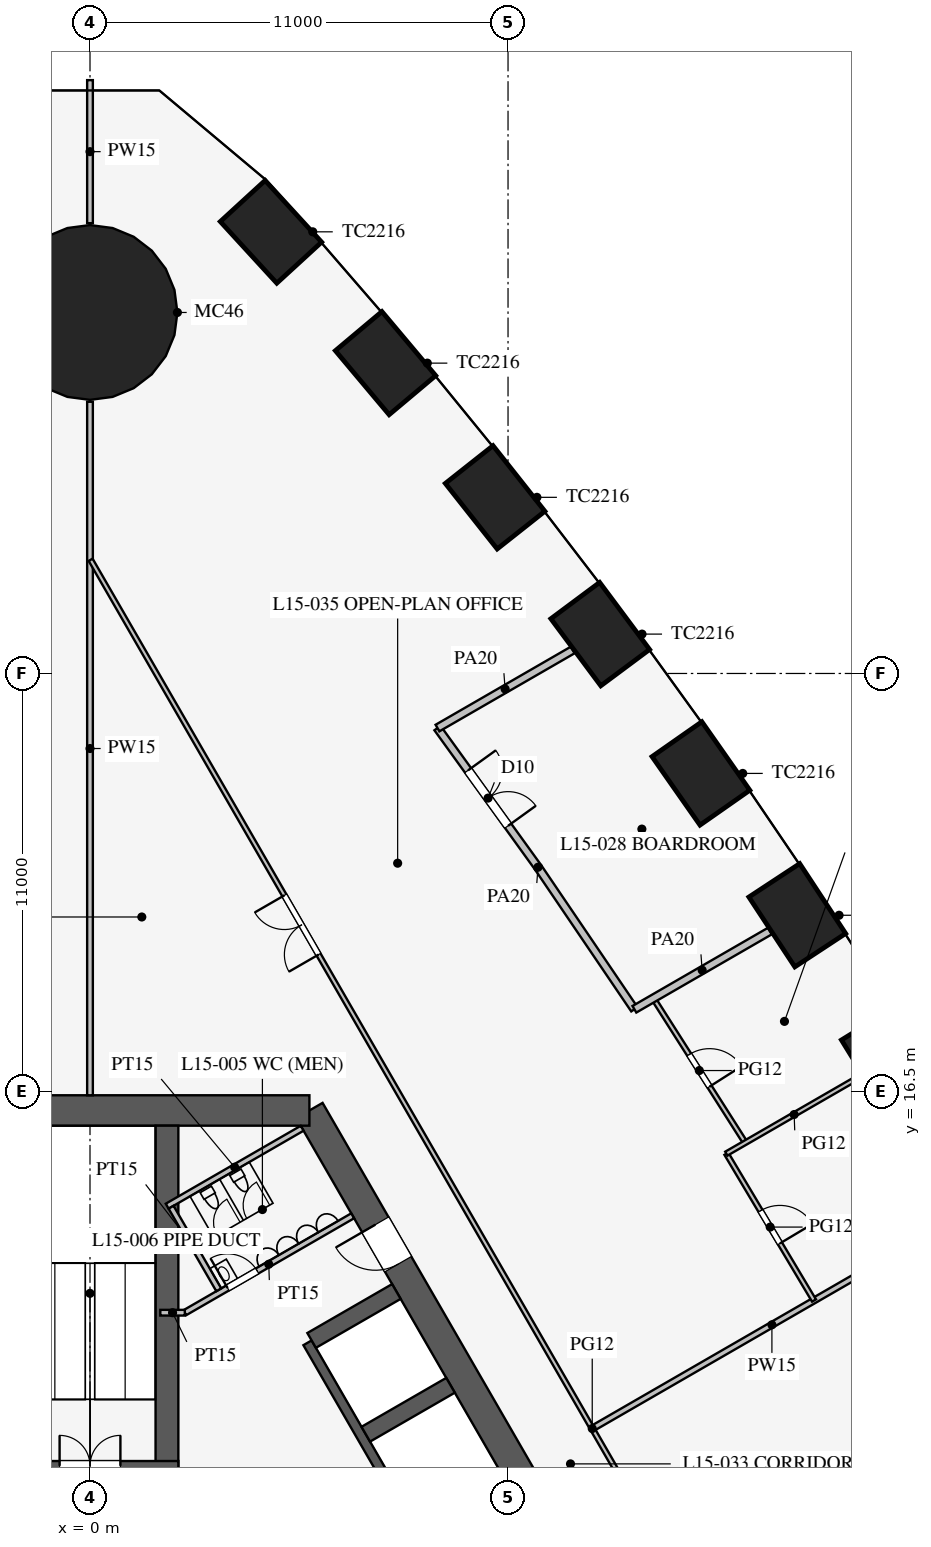
"""IFC4 building model, lengths in metres.
Left out: names, types, materials, properties, quantities, classifications, styles, units other than length and angle.
Written with IfcOpenShell. Run it as: python <this file> out.ifc"""

import sys

from ifc_helpers import new_model, si_unit, direction, frame, frame_2d, origin, origin_2d, place, context, subcontext, project, spatial, rectangle, circle, extrude, element, fill, save


model = new_model("IFC4")
c1 = context("Model", 3, precision=1e-05, world=origin(), true_north=direction((0.0, 1.0)))
c2 = subcontext(c1, "Body", "Model", "MODEL_VIEW")
j1 = project(units=[si_unit("LENGTHUNIT", "METRE"), si_unit("PLANEANGLEUNIT", "RADIAN")], contexts=[c1])
p1 = place(None, origin())
s1 = spatial("IfcSite", under=j1, at=p1, CompositionType="ELEMENT")
p2 = place(p1, origin())
s2 = spatial("IfcBuilding", under=s1, at=p2, CompositionType="ELEMENT")
p3 = place(p2, frame((0.0, 0.0, 66.9)))
s3 = spatial("IfcBuildingStorey", under=s2, at=p3, CompositionType="ELEMENT", Elevation=66.9)
for number, where, z_axis, x_axis in (
    (1, (21.031, 17.339, 0.0), (0.0, 0.0, 1.0), (-0.525, 0.851, 0.0)),
    (2, (18.611, 21.137, 0.0), (0.0, 0.0, 1.0), (-0.549, 0.836, 0.0)),
    (3, (16.076, 24.87, 0.0), (0.0, 0.0, 1.0), (-0.574, 0.819, 0.0)),
    (4, (13.426, 28.536, 0.0), (0.0, 0.0, 1.0), (-0.597, 0.802, 0.0)),
    (5, (10.66, 32.135, 0.0), (0.0, 0.0, 1.0), (-0.62, 0.784, 0.0)),
    (6, (7.776, 35.667, 0.0), (0.0, 0.0, 1.0), (-0.643, 0.766, 0.0)),
    (7, (4.762, 39.122, 0.0), (0.0, 0.0, 1.0), (-0.676, 0.737, 0.0)),
):
    element("IfcColumn", number, at=place(p3, frame(where, z_axis=z_axis, x_axis=x_axis)), inside=s3, PredefinedType="COLUMN", context=c2, shape_type="SweptSolid", body=[
        extrude(rectangle(XDim=2.2, YDim=1.6, at=origin_2d()), origin(), (0.0, 0.0, 1.0), 4.2),
    ])
p4 = place(p3, frame((0.0, 37.0, 0.0), z_axis=(0.0, 0.0, 1.0), x_axis=(1.0, 0.0, 0.0)))
e8 = element("IfcColumn", 8, at=p4, inside=s3, PredefinedType="COLUMN", context=c2, shape_type="SweptSolid", body=[
    extrude(circle(Radius=2.3, at=origin_2d()), origin(), (0.0, 0.0, 1.0), 4.2),
])
p5 = place(p3, frame((16.743, -3.0, 0.0), z_axis=(0.0, 0.0, 1.0), x_axis=(-0.500002442456, 0.866023993627, 0.0)))
e9 = element("IfcWall", 9, at=p5, inside=s3, PredefinedType="SHEAR", context=c2, shape_type="SweptSolid", body=[
    extrude(rectangle(XDim=21.939, YDim=0.8, at=frame_2d((10.97, 0.0))), origin(), (0.0, 0.0, 1.0), 4.2),
])
p6 = place(p5, frame((17.27, 0.0, 0.0)))
e10 = element("IfcOpeningElement", 10, at=p6, cuts=e9, PredefinedType="OPENING", context=c2, shape_type="SweptSolid", body=[
    extrude(rectangle(XDim=1.2, YDim=2.1, at=frame_2d((0.6, 1.05))), frame((0.0, 0.41, 0.0), z_axis=(0.0, -1.0, 0.0), x_axis=(1.0, 0.0, 0.0)), (0.0, 0.0, 1.0), 0.82),
])
p7 = place(p5, frame((3.47, 0.0, 0.0)))
e11 = element("IfcOpeningElement", 11, at=p7, cuts=e9, PredefinedType="OPENING", context=c2, shape_type="SweptSolid", body=[
    extrude(rectangle(XDim=1.2, YDim=2.1, at=frame_2d((0.6, 1.05))), frame((0.0, 0.41, 0.0), z_axis=(0.0, -1.0, 0.0), x_axis=(1.0, 0.0, 0.0)), (0.0, 0.0, 1.0), 0.82),
])
p8 = place(p3, frame((5.773, 16.0, 0.0), z_axis=(0.0, 0.0, 1.0), x_axis=(-1.0, 0.0, 0.0)))
e12 = element("IfcWall", 12, at=p8, inside=s3, PredefinedType="SHEAR", context=c2, shape_type="SweptSolid", body=[
    extrude(rectangle(XDim=11.547, YDim=0.8, at=frame_2d((5.773, 0.0))), origin(), (0.0, 0.0, 1.0), 4.2),
])
p9 = place(p3, frame((11.424, 0.014, 0.0), z_axis=(0.0, 0.0, 1.0), x_axis=(-0.500001763848, 0.866024385424, 0.0)))
e13 = element("IfcWall", 13, at=p9, inside=s3, PredefinedType="SHEAR", context=c2, shape_type="SweptSolid", body=[
    extrude(rectangle(XDim=11.4, YDim=0.25, at=frame_2d((5.7, 0.0))), origin(), (0.0, 0.0, 1.0), 4.2),
])
p10 = place(p3, frame((7.257, 7.481, 0.0), z_axis=(0.0, 0.0, 1.0), x_axis=(0.866046643894, 0.499963209246, 0.0)))
e14 = element("IfcWall", 14, at=p10, inside=s3, PredefinedType="SHEAR", context=c2, shape_type="SweptSolid", body=[
    extrude(rectangle(XDim=2.575, YDim=0.45, at=frame_2d((1.288, 0.0))), origin(), (0.0, 0.0, 1.0), 4.2),
])
p11 = place(p3, frame((5.832, 9.949, 0.0), z_axis=(0.0, 0.0, 1.0), x_axis=(0.866029291668, 0.499993265928, 0.0)))
e15 = element("IfcWall", 15, at=p11, inside=s3, PredefinedType="SHEAR", context=c2, shape_type="SweptSolid", body=[
    extrude(rectangle(XDim=2.575, YDim=0.45, at=frame_2d((1.288, 0.0))), origin(), (0.0, 0.0, 1.0), 4.2),
])
p12 = place(p3, frame((2.025, 6.525, 0.0), z_axis=(0.0, 0.0, 1.0), x_axis=(0.0, 1.0, 0.0)))
e16 = element("IfcWall", 16, at=p12, inside=s3, PredefinedType="SHEAR", context=c2, shape_type="SweptSolid", body=[
    extrude(rectangle(XDim=9.075, YDim=0.6, at=frame_2d((4.538, 0.0))), origin(), (0.0, 0.0, 1.0), 4.2),
])
p13 = place(p3, frame((2.325, 6.65, 0.0), z_axis=(0.0, 0.0, 1.0), x_axis=(-1.0, 0.0, 0.0)))
e17 = element("IfcWall", 17, at=p13, inside=s3, PredefinedType="SHEAR", context=c2, shape_type="SweptSolid", body=[
    extrude(rectangle(XDim=4.65, YDim=0.25, at=frame_2d((2.325, 0.0))), origin(), (0.0, 0.0, 1.0), 4.2),
])
p14 = place(p13, frame((1.525, 0.0, 0.0)))
e18 = element("IfcOpeningElement", 18, at=p14, cuts=e17, PredefinedType="OPENING", context=c2, shape_type="SweptSolid", body=[
    extrude(rectangle(XDim=1.6, YDim=2.1, at=frame_2d((0.8, 1.05))), frame((0.0, 0.135, 0.0), z_axis=(0.0, -1.0, 0.0), x_axis=(1.0, 0.0, 0.0)), (0.0, 0.0, 1.0), 0.27),
])
p15 = place(p3, frame((2.495, 10.678, 0.0), z_axis=(0.0, 0.0, 1.0), x_axis=(0.86602216432, 0.500005610874, 0.0)))
e19 = element("IfcWall", 19, at=p15, inside=s3, PredefinedType="PARTITIONING", context=c2, shape_type="SweptSolid", body=[
    extrude(rectangle(XDim=5.1, YDim=0.15, at=frame_2d((2.55, 0.0))), origin(), (0.0, 0.0, 1.0), 4.0),
])
p16 = place(p15, frame((1.3, 0.0, 0.0)))
e20 = element("IfcOpeningElement", 20, at=p16, cuts=e19, PredefinedType="OPENING", context=c2, shape_type="SweptSolid", body=[
    extrude(rectangle(XDim=0.9, YDim=2.1, at=frame_2d((0.45, 1.05))), frame((0.0, 0.085, 0.0), z_axis=(0.0, -1.0, 0.0), x_axis=(1.0, 0.0, 0.0)), (0.0, 0.0, 1.0), 0.17),
])
p17 = place(p3, frame((2.495, 10.678, 0.0), z_axis=(0.0, 0.0, 1.0), x_axis=(-1.0, 0.0, 0.0)))
e21 = element("IfcWall", 21, at=p17, inside=s3, PredefinedType="PARTITIONING", context=c2, shape_type="SweptSolid", body=[
    extrude(rectangle(XDim=0.645, YDim=0.15, at=frame_2d((0.323, 0.0))), origin(), (0.0, 0.0, 1.0), 4.0),
])
p18 = place(p3, frame((2.031, 13.482, 0.0), z_axis=(0.0, 0.0, 1.0), x_axis=(0.866050731258, 0.499956128963, 0.0)))
e22 = element("IfcWall", 22, at=p18, inside=s3, PredefinedType="PARTITIONING", context=c2, shape_type="SweptSolid", body=[
    extrude(rectangle(XDim=4.1, YDim=0.15, at=frame_2d((2.05, 0.0))), origin(), (0.0, 0.0, 1.0), 4.0),
])
p19 = place(p3, frame((3.389, 11.281, 0.0), z_axis=(0.0, 0.0, 1.0), x_axis=(-0.499989096993, 0.866031698547, 0.0)))
e23 = element("IfcWall", 23, at=p19, inside=s3, PredefinedType="PARTITIONING", context=c2, shape_type="SweptSolid", body=[
    extrude(rectangle(XDim=2.51, YDim=0.15, at=frame_2d((1.255, 0.0))), origin(), (0.0, 0.0, 1.0), 4.0),
])
p20 = place(p3, frame((0.0, 16.4, 0.0), z_axis=(0.0, 0.0, 1.0), x_axis=(0.0, 1.0, 0.0)))
e24 = element("IfcWall", 24, at=p20, inside=s3, PredefinedType="PARTITIONING", context=c2, shape_type="SweptSolid", body=[
    extrude(rectangle(XDim=18.25, YDim=0.15, at=frame_2d((9.125, 0.0))), origin(), (0.0, 0.0, 1.0), 2.3),
])
p21 = place(p3, frame((0.0, 39.35, 0.0), z_axis=(0.0, 0.0, 1.0), x_axis=(0.0, 1.0, 0.0)))
e25 = element("IfcWall", 25, at=p21, inside=s3, PredefinedType="PARTITIONING", context=c2, shape_type="SweptSolid", body=[
    extrude(rectangle(XDim=3.764, YDim=0.15, at=frame_2d((1.882, 0.0))), origin(), (0.0, 0.0, 1.0), 2.3),
])
p22 = place(p3, frame((13.268, 7.66, 0.0), z_axis=(0.0, 0.0, 1.0), x_axis=(0.866019550038, 0.50001013885, 0.0)))
e26 = element("IfcWall", 26, at=p22, inside=s3, PredefinedType="PARTITIONING", context=c2, shape_type="SweptSolid", body=[
    extrude(rectangle(XDim=10.799, YDim=0.15, at=frame_2d((5.399, 0.0))), origin(), (0.0, 0.0, 1.0), 2.8),
])
p23 = place(p3, frame((26.415, -15.231, 0.0), z_axis=(0.0, 0.0, 1.0), x_axis=(-0.50000091641, 0.866024874695, 0.0)))
e27 = element("IfcWall", 27, at=p23, inside=s3, PredefinedType="PARTITIONING", context=c2, shape_type="SweptSolid", body=[
    extrude(rectangle(XDim=52.796, YDim=0.12, at=frame_2d((26.398, 0.0))), origin(), (0.0, 0.0, 1.0), 2.9),
])
p24 = place(p23, frame((10.2, 0.0, 0.15)))
e28 = element("IfcOpeningElement", 28, at=p24, cuts=e27, PredefinedType="OPENING", context=c2, shape_type="SweptSolid", body=[
    extrude(rectangle(XDim=1.8, YDim=2.1, at=frame_2d((0.9, 1.05))), frame((0.0, 0.07, 0.0), z_axis=(0.0, -1.0, 0.0), x_axis=(1.0, 0.0, 0.0)), (0.0, 0.0, 1.0), 0.14),
])
p25 = place(p23, frame((40.8, 0.0, 0.15)))
e29 = element("IfcOpeningElement", 29, at=p25, cuts=e27, PredefinedType="OPENING", context=c2, shape_type="SweptSolid", body=[
    extrude(rectangle(XDim=1.8, YDim=2.1, at=frame_2d((0.9, 1.05))), frame((0.0, 0.07, 0.0), z_axis=(0.0, -1.0, 0.0), x_axis=(1.0, 0.0, 0.0)), (0.0, 0.0, 1.0), 0.14),
])
p26 = place(p3, frame((19.052, 10.999, 0.0), z_axis=(0.0, 0.0, 1.0), x_axis=(-0.51252396108, 0.858672923364, 0.0)))
e30 = element("IfcWall", 30, at=p26, inside=s3, PredefinedType="PARTITIONING", context=c2, shape_type="SweptSolid", body=[
    extrude(rectangle(XDim=4.5, YDim=0.12, at=frame_2d((2.25, 0.0))), origin(), (0.0, 0.0, 1.0), 2.9),
])
p27 = place(p26, frame((1.75, 0.0, 0.15)))
e31 = element("IfcOpeningElement", 31, at=p27, cuts=e30, PredefinedType="OPENING", context=c2, shape_type="SweptSolid", body=[
    extrude(rectangle(XDim=1.0, YDim=2.1, at=frame_2d((0.5, 1.05))), frame((0.0, 0.07, 0.0), z_axis=(0.0, -1.0, 0.0), x_axis=(1.0, 0.0, 0.0)), (0.0, 0.0, 1.0), 0.14),
])
p28 = place(p3, frame((11.792, 22.396, 0.0), z_axis=(0.0, 0.0, 1.0), x_axis=(-0.585376255171, 0.810761765183, 0.0)))
e32 = element("IfcWall", 32, at=p28, inside=s3, PredefinedType="PARTITIONING", context=c2, shape_type="SweptSolid", body=[
    extrude(rectangle(XDim=4.523, YDim=0.2, at=frame_2d((2.262, 0.0))), origin(), (0.0, 0.0, 1.0), 2.9),
])
p29 = place(p28, frame((1.35, 0.0, 0.15)))
e33 = element("IfcOpeningElement", 33, at=p29, cuts=e32, PredefinedType="OPENING", context=c2, shape_type="SweptSolid", body=[
    extrude(rectangle(XDim=1.8, YDim=2.1, at=frame_2d((0.9, 1.05))), frame((0.0, 0.11, 0.0), z_axis=(0.0, -1.0, 0.0), x_axis=(1.0, 0.0, 0.0)), (0.0, 0.0, 1.0), 0.22),
])
p30 = place(p3, frame((17.243, 15.151, 0.0), z_axis=(0.0, 0.0, 1.0), x_axis=(-0.537243691336, 0.843427066272, 0.0)))
e34 = element("IfcWall", 34, at=p30, inside=s3, PredefinedType="PARTITIONING", context=c2, shape_type="SweptSolid", body=[
    extrude(rectangle(XDim=4.504, YDim=0.12, at=frame_2d((2.252, 0.0))), origin(), (0.0, 0.0, 1.0), 2.9),
])
p31 = place(p30, frame((1.75, 0.0, 0.15)))
e35 = element("IfcOpeningElement", 35, at=p31, cuts=e34, PredefinedType="OPENING", context=c2, shape_type="SweptSolid", body=[
    extrude(rectangle(XDim=1.0, YDim=2.1, at=frame_2d((0.5, 1.05))), frame((0.0, 0.07, 0.0), z_axis=(0.0, -1.0, 0.0), x_axis=(1.0, 0.0, 0.0)), (0.0, 0.0, 1.0), 0.14),
])
p32 = place(p3, frame((14.325, 18.663, 0.0), z_axis=(0.0, 0.0, 1.0), x_axis=(-0.561512004239, 0.827468591002, 0.0)))
e36 = element("IfcWall", 36, at=p32, inside=s3, PredefinedType="PARTITIONING", context=c2, shape_type="SweptSolid", body=[
    extrude(rectangle(XDim=4.512, YDim=0.2, at=frame_2d((2.256, 0.0))), origin(), (0.0, 0.0, 1.0), 2.9),
])
p33 = place(p3, frame((9.144, 26.064, 0.0), z_axis=(0.0, 0.0, 1.0), x_axis=(0.866022320763, 0.500005339912, 0.0)))
e37 = element("IfcWall", 37, at=p33, inside=s3, PredefinedType="PARTITIONING", context=c2, shape_type="SweptSolid", body=[
    extrude(rectangle(XDim=4.109, YDim=0.2, at=frame_2d((2.054, 0.0))), origin(), (0.0, 0.0, 1.0), 2.6),
])
p34 = place(p3, frame((16.745, 14.864, 0.0), z_axis=(0.0, 0.0, 1.0), x_axis=(0.8660059538, 0.500033686847, 0.0)))
e38 = element("IfcWall", 38, at=p34, inside=s3, PredefinedType="PARTITIONING", context=c2, shape_type="SweptSolid", body=[
    extrude(rectangle(XDim=4.119, YDim=0.12, at=frame_2d((2.06, 0.0))), origin(), (0.0, 0.0, 1.0), 2.8),
])
p35 = place(p3, frame((14.325, 18.663, 0.0), z_axis=(0.0, 0.0, 1.0), x_axis=(0.866030556495, 0.499991075137, 0.0)))
e39 = element("IfcWall", 39, at=p35, inside=s3, PredefinedType="PARTITIONING", context=c2, shape_type="SweptSolid", body=[
    extrude(rectangle(XDim=4.117, YDim=0.2, at=frame_2d((2.059, 0.0))), origin(), (0.0, 0.0, 1.0), 2.8),
])
p36 = place(p16, origin())
e40 = element("IfcDoor", 40, at=p36, inside=s3, OperationType="SINGLE_SWING_LEFT", PredefinedType="DOOR", context=c2, shape_type="SweptSolid", body=[
    extrude(rectangle(XDim=0.9, YDim=2.1, at=frame_2d((0.45, 1.05))), frame((0.0, 0.025, 0.0), z_axis=(0.0, -1.0, 0.0), x_axis=(1.0, 0.0, 0.0)), (0.0, 0.0, 1.0), 0.05),
])
fill(e20, e40)
p37 = place(p14, frame((1.6, 0.0, 0.0), z_axis=(0.0, 0.0, 1.0), x_axis=(-1.0, 0.0, 0.0)))
e41 = element("IfcDoor", 41, at=p37, inside=s3, OperationType="DOUBLE_DOOR_SINGLE_SWING", PredefinedType="DOOR", context=c2, shape_type="SweptSolid", body=[
    extrude(rectangle(XDim=1.6, YDim=2.1, at=frame_2d((0.8, 1.05))), frame((0.0, 0.025, 0.0), z_axis=(0.0, -1.0, 0.0), x_axis=(1.0, 0.0, 0.0)), (0.0, 0.0, 1.0), 0.05),
])
fill(e18, e41)
p38 = place(p6, origin())
e42 = element("IfcDoor", 42, at=p38, inside=s3, OperationType="SINGLE_SWING_RIGHT", PredefinedType="DOOR", context=c2, shape_type="SweptSolid", body=[
    extrude(rectangle(XDim=1.2, YDim=2.1, at=frame_2d((0.6, 1.05))), frame((0.0, 0.025, 0.0), z_axis=(0.0, -1.0, 0.0), x_axis=(1.0, 0.0, 0.0)), (0.0, 0.0, 1.0), 0.05),
])
fill(e10, e42)
p39 = place(p29, frame((1.8, 0.0, 0.0), z_axis=(0.0, 0.0, 1.0), x_axis=(-1.0, 0.0, 0.0)))
e43 = element("IfcDoor", 43, at=p39, inside=s3, OperationType="DOUBLE_DOOR_SINGLE_SWING", PredefinedType="DOOR", context=c2, shape_type="SweptSolid", body=[
    extrude(rectangle(XDim=1.8, YDim=2.1, at=frame_2d((0.9, 1.05))), frame((0.0, 0.025, 0.0), z_axis=(0.0, -1.0, 0.0), x_axis=(1.0, 0.0, 0.0)), (0.0, 0.0, 1.0), 0.05),
])
fill(e33, e43)
p40 = place(p31, frame((1.0, 0.0, 0.0), z_axis=(0.0, 0.0, 1.0), x_axis=(-1.0, 0.0, 0.0)))
e44 = element("IfcDoor", 44, at=p40, inside=s3, OperationType="SINGLE_SWING_RIGHT", PredefinedType="DOOR", context=c2, shape_type="SweptSolid", body=[
    extrude(rectangle(XDim=1.0, YDim=2.1, at=frame_2d((0.5, 1.05))), frame((0.0, 0.025, 0.0), z_axis=(0.0, -1.0, 0.0), x_axis=(1.0, 0.0, 0.0)), (0.0, 0.0, 1.0), 0.05),
])
fill(e35, e44)
p41 = place(p27, frame((1.0, 0.0, 0.0), z_axis=(0.0, 0.0, 1.0), x_axis=(-1.0, 0.0, 0.0)))
e45 = element("IfcDoor", 45, at=p41, inside=s3, OperationType="SINGLE_SWING_RIGHT", PredefinedType="DOOR", context=c2, shape_type="SweptSolid", body=[
    extrude(rectangle(XDim=1.0, YDim=2.1, at=frame_2d((0.5, 1.05))), frame((0.0, 0.025, 0.0), z_axis=(0.0, -1.0, 0.0), x_axis=(1.0, 0.0, 0.0)), (0.0, 0.0, 1.0), 0.05),
])
fill(e31, e45)
p42 = place(p25, origin())
e46 = element("IfcDoor", 46, at=p42, inside=s3, OperationType="DOUBLE_DOOR_SINGLE_SWING", PredefinedType="DOOR", context=c2, shape_type="SweptSolid", body=[
    extrude(rectangle(XDim=1.8, YDim=2.1, at=frame_2d((0.9, 1.05))), frame((0.0, 0.025, 0.0), z_axis=(0.0, -1.0, 0.0), x_axis=(1.0, 0.0, 0.0)), (0.0, 0.0, 1.0), 0.05),
])
fill(e29, e46)
save(model, sys.argv[1])
